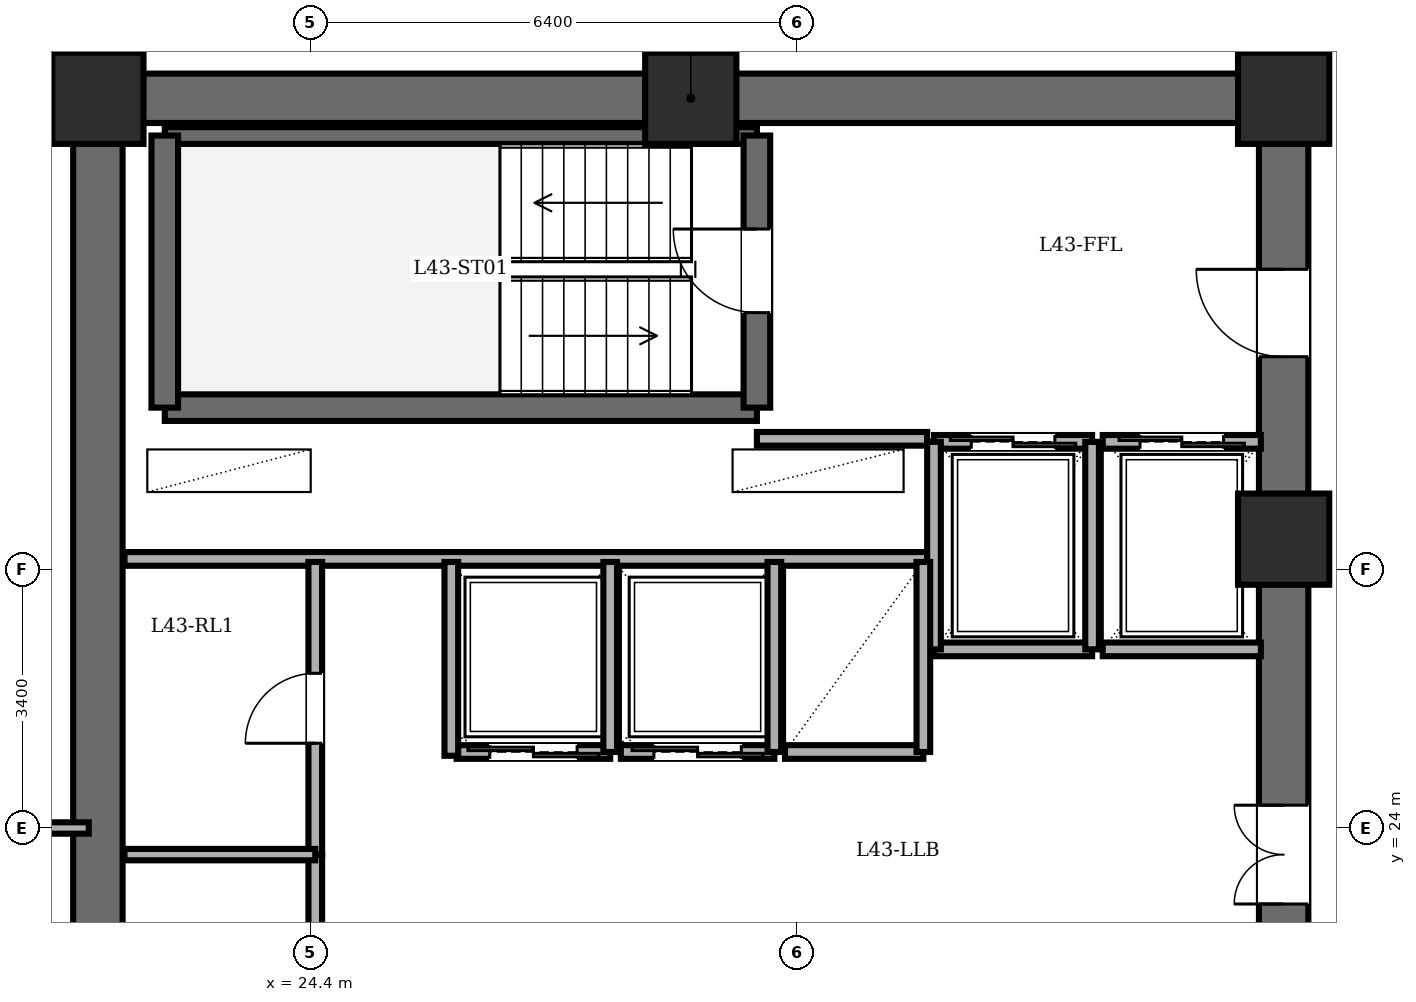
"""IFC4 building model, lengths in metres.
Left out: names, types, materials, properties, quantities, classifications, styles, units other than length and angle.
Written with IfcOpenShell. Run it as: python <this file> out.ifc"""

import sys

from ifc_helpers import new_model, si_unit, direction, frame, frame_2d, origin, origin_2d, place, context, subcontext, project, spatial, rectangle, extrude, element, fill, save


model = new_model("IFC4")
c1 = context("Model", 3, precision=1e-05, world=origin(), true_north=direction((0.0, 1.0)))
c2 = subcontext(c1, "Body", "Model", "MODEL_VIEW")
j1 = project(units=[si_unit("LENGTHUNIT", "METRE"), si_unit("PLANEANGLEUNIT", "RADIAN")], contexts=[c1])
p1 = place(None, origin())
s1 = spatial("IfcSite", under=j1, at=p1, CompositionType="ELEMENT")
p2 = place(p1, origin())
s2 = spatial("IfcBuilding", under=s1, at=p2, CompositionType="ELEMENT")
p3 = place(p2, frame((0.0, 0.0, 165.4)))
s3 = spatial("IfcBuildingStorey", under=s2, at=p3, CompositionType="ELEMENT", Elevation=165.4)
for number, where, z_axis, x_axis in (
    (1, (37.2, 27.8, 0.0), (0.0, 0.0, 1.0), (1.0, 0.0, 0.0)),
    (2, (37.2, 33.6, 0.0), (0.0, 0.0, 1.0), (1.0, 0.0, 0.0)),
    (3, (29.4, 33.6, 0.0), (0.0, 0.0, 1.0), (1.0, 0.0, 0.0)),
    (4, (21.6, 33.6, 0.0), (0.0, 0.0, 1.0), (1.0, 0.0, 0.0)),
):
    element("IfcColumn", number, at=place(p3, frame(where, z_axis=z_axis, x_axis=x_axis)), inside=s3, PredefinedType="COLUMN", context=c2, shape_type="SweptSolid", body=[
        extrude(rectangle(XDim=1.2, YDim=1.2, at=origin_2d()), origin(), (0.0, 0.0, 1.0), 3.6),
    ])
p4 = place(p3, frame((21.6, 14.4, 0.0), z_axis=(0.0, 0.0, 1.0), x_axis=(0.0, 1.0, 0.0)))
e5 = element("IfcWall", 5, at=p4, inside=s3, PredefinedType="SHEAR", context=c2, shape_type="SweptSolid", body=[
    extrude(rectangle(XDim=19.2, YDim=0.65, at=frame_2d((9.6, 0.0))), origin(), (0.0, 0.0, 1.0), 3.4),
])
p5 = place(p3, frame((21.6, 33.6, 0.0), z_axis=(0.0, 0.0, 1.0), x_axis=(1.0, 0.0, 0.0)))
e6 = element("IfcWall", 6, at=p5, inside=s3, PredefinedType="SHEAR", context=c2, shape_type="SweptSolid", body=[
    extrude(rectangle(XDim=15.6, YDim=0.65, at=frame_2d((7.8, 0.0))), origin(), (0.0, 0.0, 1.0), 3.4),
])
p6 = place(p3, frame((37.2, 14.4, 0.0), z_axis=(0.0, 0.0, 1.0), x_axis=(0.0, 1.0, 0.0)))
e7 = element("IfcWall", 7, at=p6, inside=s3, PredefinedType="SHEAR", context=c2, shape_type="SweptSolid", body=[
    extrude(rectangle(XDim=19.2, YDim=0.65, at=frame_2d((9.6, 0.0))), origin(), (0.0, 0.0, 1.0), 3.4),
])
p7 = place(p6, frame((15.8, 0.0, 0.0)))
e8 = element("IfcOpeningElement", 8, at=p7, cuts=e7, PredefinedType="OPENING", context=c2, shape_type="SweptSolid", body=[
    extrude(rectangle(XDim=1.15, YDim=2.15, at=frame_2d((0.575, 1.075))), frame((0.0, 0.335, 0.0), z_axis=(0.0, -1.0, 0.0), x_axis=(1.0, 0.0, 0.0)), (0.0, 0.0, 1.0), 0.67),
])
p8 = place(p6, frame((3.6, 0.0, 0.0)))
e9 = element("IfcOpeningElement", 9, at=p8, cuts=e7, PredefinedType="OPENING", context=c2, shape_type="SweptSolid", body=[
    extrude(rectangle(XDim=1.1, YDim=2.15, at=frame_2d((0.55, 1.075))), frame((0.0, 0.335, 0.0), z_axis=(0.0, -1.0, 0.0), x_axis=(1.0, 0.0, 0.0)), (0.0, 0.0, 1.0), 0.67),
])
p9 = place(p6, frame((8.6, 0.0, 0.0)))
e10 = element("IfcOpeningElement", 10, at=p9, cuts=e7, PredefinedType="OPENING", context=c2, shape_type="SweptSolid", body=[
    extrude(rectangle(XDim=1.3, YDim=2.2, at=frame_2d((0.65, 1.1))), frame((0.0, 0.335, 0.0), z_axis=(0.0, -1.0, 0.0), x_axis=(1.0, 0.0, 0.0)), (0.0, 0.0, 1.0), 0.67),
])
p10 = place(p3, frame((22.48, 29.53, 0.0), z_axis=(0.0, 0.0, 1.0), x_axis=(1.0, 0.0, 0.0)))
e11 = element("IfcWall", 11, at=p10, inside=s3, PredefinedType="SOLIDWALL", context=c2, shape_type="SweptSolid", body=[
    extrude(rectangle(XDim=7.79, YDim=0.35, at=frame_2d((3.895, 0.0))), origin(), (0.0, 0.0, 1.0), 3.4),
])
p11 = place(p3, frame((22.48, 33.11, 0.0), z_axis=(0.0, 0.0, 1.0), x_axis=(1.0, 0.0, 0.0)))
e12 = element("IfcWall", 12, at=p11, inside=s3, PredefinedType="PARTITIONING", context=c2, shape_type="SweptSolid", body=[
    extrude(rectangle(XDim=7.79, YDim=0.22, at=frame_2d((3.895, 0.0))), origin(), (0.0, 0.0, 1.0), 3.4),
])
p12 = place(p3, frame((22.48, 29.53, 0.0), z_axis=(0.0, 0.0, 1.0), x_axis=(0.0, 1.0, 0.0)))
e13 = element("IfcWall", 13, at=p12, inside=s3, PredefinedType="SOLIDWALL", context=c2, shape_type="SweptSolid", body=[
    extrude(rectangle(XDim=3.58, YDim=0.35, at=frame_2d((1.79, 0.0))), origin(), (0.0, 0.0, 1.0), 3.4),
])
p13 = place(p3, frame((30.27, 29.53, 0.0), z_axis=(0.0, 0.0, 1.0), x_axis=(0.0, 1.0, 0.0)))
e14 = element("IfcWall", 14, at=p13, inside=s3, PredefinedType="SOLIDWALL", context=c2, shape_type="SweptSolid", body=[
    extrude(rectangle(XDim=3.58, YDim=0.35, at=frame_2d((1.79, 0.0))), origin(), (0.0, 0.0, 1.0), 3.4),
])
p14 = place(p13, frame((1.25, 0.0, 0.0)))
e15 = element("IfcOpeningElement", 15, at=p14, cuts=e14, PredefinedType="OPENING", context=c2, shape_type="SweptSolid", body=[
    extrude(rectangle(XDim=1.1, YDim=2.15, at=frame_2d((0.55, 1.075))), frame((0.0, 0.185, 0.0), z_axis=(0.0, -1.0, 0.0), x_axis=(1.0, 0.0, 0.0)), (0.0, 0.0, 1.0), 0.37),
])
p15 = place(p3, frame((30.27, 29.12, 0.0), z_axis=(0.0, 0.0, 1.0), x_axis=(1.0, 0.0, 0.0)))
e16 = element("IfcWall", 16, at=p15, inside=s3, PredefinedType="PARTITIONING", context=c2, shape_type="SweptSolid", body=[
    extrude(rectangle(XDim=2.24, YDim=0.18, at=frame_2d((1.12, 0.0))), origin(), (0.0, 0.0, 1.0), 3.4),
])
p16 = place(p3, frame((21.95, 27.54, 0.0), z_axis=(0.0, 0.0, 1.0), x_axis=(1.0, 0.0, 0.0)))
e17 = element("IfcWall", 17, at=p16, inside=s3, PredefinedType="PARTITIONING", context=c2, shape_type="SweptSolid", body=[
    extrude(rectangle(XDim=10.56, YDim=0.18, at=frame_2d((5.28, 0.0))), origin(), (0.0, 0.0, 1.0), 3.4),
])
p17 = place(p3, frame((32.6, 29.08, 0.0), z_axis=(0.0, 0.0, 1.0), x_axis=(1.0, 0.0, 0.0)))
e18 = element("IfcWall", 18, at=p17, inside=s3, PredefinedType="PARTITIONING", context=c2, shape_type="SweptSolid", body=[
    extrude(rectangle(XDim=2.08, YDim=0.18, at=frame_2d((1.04, 0.0))), origin(), (0.0, 0.0, 1.0), 3.4),
])
p18 = place(p17, frame((0.49, 0.0, 0.0)))
e19 = element("IfcOpeningElement", 19, at=p18, cuts=e18, PredefinedType="OPENING", context=c2, shape_type="SweptSolid", body=[
    extrude(rectangle(XDim=1.1, YDim=2.2, at=frame_2d((0.55, 1.1))), frame((0.0, 0.1, 0.0), z_axis=(0.0, -1.0, 0.0), x_axis=(1.0, 0.0, 0.0)), (0.0, 0.0, 1.0), 0.2),
])
p19 = place(p3, frame((34.68, 26.35, 0.0), z_axis=(0.0, 0.0, 1.0), x_axis=(-1.0, 0.0, 0.0)))
e20 = element("IfcWall", 20, at=p19, inside=s3, PredefinedType="PARTITIONING", context=c2, shape_type="SweptSolid", body=[
    extrude(rectangle(XDim=2.08, YDim=0.18, at=frame_2d((1.04, 0.0))), origin(), (0.0, 0.0, 1.0), 3.4),
])
for number, where, z_axis, x_axis in (
    (21, (34.68, 26.35, 0.0), (0.0, 0.0, 1.0), (0.0, 1.0, 0.0)),
    (22, (32.6, 29.08, 0.0), (0.0, 0.0, 1.0), (0.0, -1.0, 0.0)),
):
    element("IfcWall", number, at=place(p3, frame(where, z_axis=z_axis, x_axis=x_axis)), inside=s3, PredefinedType="PARTITIONING", context=c2, shape_type="SweptSolid", body=[
        extrude(rectangle(XDim=2.73, YDim=0.18, at=frame_2d((1.365, 0.0))), origin(), (0.0, 0.0, 1.0), 3.4),
    ])
p20 = place(p3, frame((34.82, 29.08, 0.0), z_axis=(0.0, 0.0, 1.0), x_axis=(1.0, 0.0, 0.0)))
e23 = element("IfcWall", 23, at=p20, inside=s3, PredefinedType="PARTITIONING", context=c2, shape_type="SweptSolid", body=[
    extrude(rectangle(XDim=2.08, YDim=0.18, at=frame_2d((1.04, 0.0))), origin(), (0.0, 0.0, 1.0), 3.4),
])
p21 = place(p20, frame((0.49, 0.0, 0.0)))
e24 = element("IfcOpeningElement", 24, at=p21, cuts=e23, PredefinedType="OPENING", context=c2, shape_type="SweptSolid", body=[
    extrude(rectangle(XDim=1.1, YDim=2.2, at=frame_2d((0.55, 1.1))), frame((0.0, 0.1, 0.0), z_axis=(0.0, -1.0, 0.0), x_axis=(1.0, 0.0, 0.0)), (0.0, 0.0, 1.0), 0.2),
])
p22 = place(p3, frame((36.9, 26.35, 0.0), z_axis=(0.0, 0.0, 1.0), x_axis=(-1.0, 0.0, 0.0)))
e25 = element("IfcWall", 25, at=p22, inside=s3, PredefinedType="PARTITIONING", context=c2, shape_type="SweptSolid", body=[
    extrude(rectangle(XDim=2.08, YDim=0.18, at=frame_2d((1.04, 0.0))), origin(), (0.0, 0.0, 1.0), 3.4),
])
p23 = place(p3, frame((28.34, 25.0, 0.0), z_axis=(0.0, 0.0, 1.0), x_axis=(-1.0, 0.0, 0.0)))
e26 = element("IfcWall", 26, at=p23, inside=s3, PredefinedType="PARTITIONING", context=c2, shape_type="SweptSolid", body=[
    extrude(rectangle(XDim=2.02, YDim=0.18, at=frame_2d((1.01, 0.0))), origin(), (0.0, 0.0, 1.0), 3.4),
])
p24 = place(p23, frame((0.435, 0.0, 0.0)))
e27 = element("IfcOpeningElement", 27, at=p24, cuts=e26, PredefinedType="OPENING", context=c2, shape_type="SweptSolid", body=[
    extrude(rectangle(XDim=1.15, YDim=2.2, at=frame_2d((0.575, 1.1))), frame((0.0, 0.1, 0.0), z_axis=(0.0, -1.0, 0.0), x_axis=(1.0, 0.0, 0.0)), (0.0, 0.0, 1.0), 0.2),
])
p25 = place(p3, frame((28.34, 25.0, 0.0), z_axis=(0.0, 0.0, 1.0), x_axis=(0.0, 1.0, 0.0)))
e28 = element("IfcWall", 28, at=p25, inside=s3, PredefinedType="PARTITIONING", context=c2, shape_type="SweptSolid", body=[
    extrude(rectangle(XDim=2.5, YDim=0.18, at=frame_2d((1.25, 0.0))), origin(), (0.0, 0.0, 1.0), 3.4),
])
p26 = place(p3, frame((30.5, 25.0, 0.0), z_axis=(0.0, 0.0, 1.0), x_axis=(-1.0, 0.0, 0.0)))
e29 = element("IfcWall", 29, at=p26, inside=s3, PredefinedType="PARTITIONING", context=c2, shape_type="SweptSolid", body=[
    extrude(rectangle(XDim=2.02, YDim=0.18, at=frame_2d((1.01, 0.0))), origin(), (0.0, 0.0, 1.0), 3.4),
])
p27 = place(p26, frame((0.435, 0.0, 0.0)))
e30 = element("IfcOpeningElement", 30, at=p27, cuts=e29, PredefinedType="OPENING", context=c2, shape_type="SweptSolid", body=[
    extrude(rectangle(XDim=1.15, YDim=2.2, at=frame_2d((0.575, 1.1))), frame((0.0, 0.1, 0.0), z_axis=(0.0, -1.0, 0.0), x_axis=(1.0, 0.0, 0.0)), (0.0, 0.0, 1.0), 0.2),
])
p28 = place(p3, frame((30.5, 25.0, 0.0), z_axis=(0.0, 0.0, 1.0), x_axis=(0.0, 1.0, 0.0)))
e31 = element("IfcWall", 31, at=p28, inside=s3, PredefinedType="PARTITIONING", context=c2, shape_type="SweptSolid", body=[
    extrude(rectangle(XDim=2.5, YDim=0.18, at=frame_2d((1.25, 0.0))), origin(), (0.0, 0.0, 1.0), 3.4),
])
p29 = place(p3, frame((32.46, 25.0, 0.0), z_axis=(0.0, 0.0, 1.0), x_axis=(-1.0, 0.0, 0.0)))
e32 = element("IfcWall", 32, at=p29, inside=s3, PredefinedType="PARTITIONING", context=c2, shape_type="SweptSolid", body=[
    extrude(rectangle(XDim=1.82, YDim=0.18, at=frame_2d((0.91, 0.0))), origin(), (0.0, 0.0, 1.0), 3.4),
])
p30 = place(p3, frame((32.46, 25.0, 0.0), z_axis=(0.0, 0.0, 1.0), x_axis=(0.0, 1.0, 0.0)))
e33 = element("IfcWall", 33, at=p30, inside=s3, PredefinedType="PARTITIONING", context=c2, shape_type="SweptSolid", body=[
    extrude(rectangle(XDim=2.5, YDim=0.18, at=frame_2d((1.25, 0.0))), origin(), (0.0, 0.0, 1.0), 3.4),
])
p31 = place(p3, frame((24.46, 23.65, 0.0), z_axis=(0.0, 0.0, 1.0), x_axis=(0.0, 1.0, 0.0)))
e34 = element("IfcWall", 34, at=p31, inside=s3, PredefinedType="PARTITIONING", context=c2, shape_type="SweptSolid", body=[
    extrude(rectangle(XDim=3.85, YDim=0.18, at=frame_2d((1.925, 0.0))), origin(), (0.0, 0.0, 1.0), 3.4),
])
p32 = place(p31, frame((1.465, 0.0, 0.0)))
e35 = element("IfcOpeningElement", 35, at=p32, cuts=e34, PredefinedType="OPENING", context=c2, shape_type="SweptSolid", body=[
    extrude(rectangle(XDim=0.92, YDim=2.1, at=frame_2d((0.46, 1.05))), frame((0.0, 0.1, 0.0), z_axis=(0.0, -1.0, 0.0), x_axis=(1.0, 0.0, 0.0)), (0.0, 0.0, 1.0), 0.2),
])
p33 = place(p3, frame((24.46, 19.8, 0.0), z_axis=(0.0, 0.0, 1.0), x_axis=(0.0, 1.0, 0.0)))
e36 = element("IfcWall", 36, at=p33, inside=s3, PredefinedType="PARTITIONING", context=c2, shape_type="SweptSolid", body=[
    extrude(rectangle(XDim=3.85, YDim=0.18, at=frame_2d((1.925, 0.0))), origin(), (0.0, 0.0, 1.0), 3.4),
])
p34 = place(p33, frame((1.465, 0.0, 0.0)))
e37 = element("IfcOpeningElement", 37, at=p34, cuts=e36, PredefinedType="OPENING", context=c2, shape_type="SweptSolid", body=[
    extrude(rectangle(XDim=0.92, YDim=2.1, at=frame_2d((0.46, 1.05))), frame((0.0, 0.1, 0.0), z_axis=(0.0, -1.0, 0.0), x_axis=(1.0, 0.0, 0.0)), (0.0, 0.0, 1.0), 0.2),
])
p35 = place(p3, frame((21.95, 23.65, 0.0), z_axis=(0.0, 0.0, 1.0), x_axis=(1.0, 0.0, 0.0)))
e38 = element("IfcWall", 38, at=p35, inside=s3, PredefinedType="PARTITIONING", context=c2, shape_type="SweptSolid", body=[
    extrude(rectangle(XDim=2.51, YDim=0.15, at=frame_2d((1.255, 0.0))), origin(), (0.0, 0.0, 1.0), 3.4),
])
p36 = place(p3, frame((26.25, 24.95, 0.0), z_axis=(0.0, 0.0, 1.0), x_axis=(0.0, 1.0, 0.0)))
e39 = element("IfcWall", 39, at=p36, inside=s3, PredefinedType="PARTITIONING", context=c2, shape_type="SweptSolid", body=[
    extrude(rectangle(XDim=2.55, YDim=0.18, at=frame_2d((1.275, 0.0))), origin(), (0.0, 0.0, 1.0), 3.4),
])
p37 = place(p3, frame((13.8, 24.0, 0.0), z_axis=(0.0, 0.0, 1.0), x_axis=(1.0, 0.0, 0.0)))
e40 = element("IfcWall", 40, at=p37, inside=s3, PredefinedType="PARTITIONING", context=c2, shape_type="SweptSolid", body=[
    extrude(rectangle(XDim=7.68, YDim=0.15, at=frame_2d((3.84, 0.0))), origin(), (0.0, 0.0, 1.0), 3.4),
])
p38 = place(p3, frame((13.8, 33.82, 0.0), z_axis=(0.0, 0.0, 1.0), x_axis=(1.0, 0.0, 0.0)))
e41 = element("IfcWall", 41, at=p38, inside=s3, PredefinedType="PARTITIONING", context=c2, shape_type="SweptSolid", body=[
    extrude(rectangle(XDim=7.68, YDim=0.15, at=frame_2d((3.84, 0.0))), origin(), (0.0, 0.0, 1.0), 3.4),
])
p39 = place(p38, frame((3.68, 0.0, 0.0)))
e42 = element("IfcOpeningElement", 42, at=p39, cuts=e41, PredefinedType="OPENING", context=c2, shape_type="SweptSolid", body=[
    extrude(rectangle(XDim=1.0, YDim=2.15, at=frame_2d((0.5, 1.075))), frame((0.0, 0.085, 0.0), z_axis=(0.0, -1.0, 0.0), x_axis=(1.0, 0.0, 0.0)), (0.0, 0.0, 1.0), 0.17),
])
p40 = place(p14, origin())
e43 = element("IfcDoor", 43, at=p40, inside=s3, OperationType="SINGLE_SWING_RIGHT", PredefinedType="DOOR", context=c2, shape_type="SweptSolid", body=[
    extrude(rectangle(XDim=1.1, YDim=2.15, at=frame_2d((0.55, 1.075))), frame((0.0, 0.025, 0.0), z_axis=(0.0, -1.0, 0.0), x_axis=(1.0, 0.0, 0.0)), (0.0, 0.0, 1.0), 0.05),
])
fill(e15, e43)
p41 = place(p7, origin())
e44 = element("IfcDoor", 44, at=p41, inside=s3, OperationType="SINGLE_SWING_RIGHT", PredefinedType="DOOR", context=c2, shape_type="SweptSolid", body=[
    extrude(rectangle(XDim=1.15, YDim=2.15, at=frame_2d((0.575, 1.075))), frame((0.0, 0.025, 0.0), z_axis=(0.0, -1.0, 0.0), x_axis=(1.0, 0.0, 0.0)), (0.0, 0.0, 1.0), 0.05),
])
fill(e8, e44)
p42 = place(p18, origin())
e45 = element("IfcDoor", 45, at=p42, inside=s3, OperationType="DOUBLE_DOOR_SLIDING", PredefinedType="DOOR", context=c2, shape_type="SweptSolid", body=[
    extrude(rectangle(XDim=1.1, YDim=2.2, at=frame_2d((0.55, 1.1))), frame((0.0, 0.025, 0.0), z_axis=(0.0, -1.0, 0.0), x_axis=(1.0, 0.0, 0.0)), (0.0, 0.0, 1.0), 0.05),
])
fill(e19, e45)
p43 = place(p21, origin())
e46 = element("IfcDoor", 46, at=p43, inside=s3, OperationType="DOUBLE_DOOR_SLIDING", PredefinedType="DOOR", context=c2, shape_type="SweptSolid", body=[
    extrude(rectangle(XDim=1.1, YDim=2.2, at=frame_2d((0.55, 1.1))), frame((0.0, 0.025, 0.0), z_axis=(0.0, -1.0, 0.0), x_axis=(1.0, 0.0, 0.0)), (0.0, 0.0, 1.0), 0.05),
])
fill(e24, e46)
p44 = place(p24, origin())
e47 = element("IfcDoor", 47, at=p44, inside=s3, OperationType="DOUBLE_DOOR_SLIDING", PredefinedType="DOOR", context=c2, shape_type="SweptSolid", body=[
    extrude(rectangle(XDim=1.15, YDim=2.2, at=frame_2d((0.575, 1.1))), frame((0.0, 0.025, 0.0), z_axis=(0.0, -1.0, 0.0), x_axis=(1.0, 0.0, 0.0)), (0.0, 0.0, 1.0), 0.05),
])
fill(e27, e47)
p45 = place(p27, origin())
e48 = element("IfcDoor", 48, at=p45, inside=s3, OperationType="DOUBLE_DOOR_SLIDING", PredefinedType="DOOR", context=c2, shape_type="SweptSolid", body=[
    extrude(rectangle(XDim=1.15, YDim=2.2, at=frame_2d((0.575, 1.1))), frame((0.0, 0.025, 0.0), z_axis=(0.0, -1.0, 0.0), x_axis=(1.0, 0.0, 0.0)), (0.0, 0.0, 1.0), 0.05),
])
fill(e30, e48)
p46 = place(p32, origin())
e49 = element("IfcDoor", 49, at=p46, inside=s3, OperationType="SINGLE_SWING_LEFT", PredefinedType="DOOR", context=c2, shape_type="SweptSolid", body=[
    extrude(rectangle(XDim=0.92, YDim=2.1, at=frame_2d((0.46, 1.05))), frame((0.0, 0.025, 0.0), z_axis=(0.0, -1.0, 0.0), x_axis=(1.0, 0.0, 0.0)), (0.0, 0.0, 1.0), 0.05),
])
fill(e35, e49)
p47 = place(p9, origin())
e50 = element("IfcDoor", 50, at=p47, inside=s3, OperationType="DOUBLE_DOOR_SINGLE_SWING", PredefinedType="DOOR", context=c2, shape_type="SweptSolid", body=[
    extrude(rectangle(XDim=1.3, YDim=2.2, at=frame_2d((0.65, 1.1))), frame((0.0, 0.025, 0.0), z_axis=(0.0, -1.0, 0.0), x_axis=(1.0, 0.0, 0.0)), (0.0, 0.0, 1.0), 0.05),
])
fill(e10, e50)
save(model, sys.argv[1])
